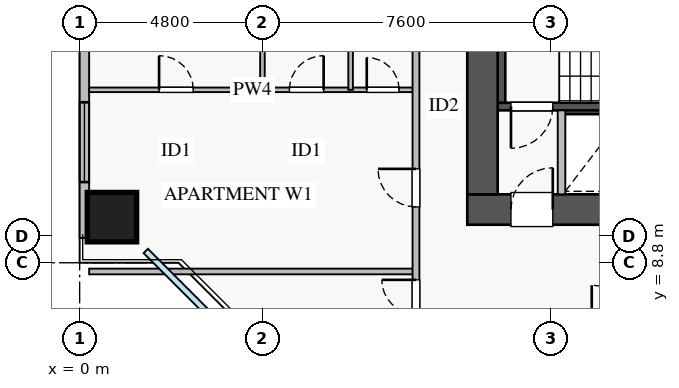
"""IFC4 building model, lengths in metres.
Left out: names, types, materials, properties, quantities, classifications, styles, units other than length and angle.
Written with IfcOpenShell. Run it as: python <this file> out.ifc"""

import sys

from ifc_helpers import new_model, si_unit, direction, frame, frame_2d, origin, origin_2d, place, context, subcontext, project, spatial, rectangle, extrude, source, transform, mapped, element, fill, save


model = new_model("IFC4")
c1 = context("Model", 3, precision=1e-05, world=origin(), true_north=direction((0.0, 1.0)))
c2 = subcontext(c1, "Body", "Model", "MODEL_VIEW")
j1 = project(units=[si_unit("LENGTHUNIT", "METRE"), si_unit("PLANEANGLEUNIT", "RADIAN")], contexts=[c1])
p1 = place(None, origin())
s1 = spatial("IfcSite", under=j1, at=p1, CompositionType="ELEMENT")
p2 = place(p1, origin())
s2 = spatial("IfcBuilding", under=s1, at=p2, CompositionType="ELEMENT")
p3 = place(p2, frame((0.0, 0.0, 32.75)))
s3 = spatial("IfcBuildingStorey", under=s2, at=p3, CompositionType="ELEMENT", Elevation=32.75)
p4 = place(p3, frame((12.68, 12.8, 0.0), z_axis=(0.0, 0.0, 1.0), x_axis=(1.0, 0.0, 0.0)))
e1 = element("IfcWall", 1, at=p4, inside=s3, PredefinedType="SHEAR", context=c2, shape_type="SweptSolid", body=[
    extrude(rectangle(XDim=1.94, YDim=0.18, at=frame_2d((0.97, 0.0))), origin(), (0.0, 0.0, 1.0), 3.07),
])
p5 = place(p3, frame((11.0, 12.91, 0.0), z_axis=(0.0, 0.0, 1.0), x_axis=(1.0, 0.0, 0.0)))
e2 = element("IfcWall", 2, at=p5, inside=s3, PredefinedType="SHEAR", context=c2, shape_type="SweptSolid", body=[
    extrude(rectangle(XDim=7.15, YDim=0.2, at=frame_2d((3.575, 0.0))), origin(), (0.0, 0.0, 1.0), 3.25),
])
p6 = place(p5, frame((0.35, 0.0, 0.0)))
e3 = element("IfcOpeningElement", 3, at=p6, cuts=e2, PredefinedType="OPENING", context=c2, shape_type="SweptSolid", body=[
    extrude(rectangle(XDim=1.1, YDim=2.05, at=frame_2d((0.55, 1.025))), frame((0.0, 0.11, 0.0), z_axis=(0.0, -1.0, 0.0), x_axis=(1.0, 0.0, 0.0)), (0.0, 0.0, 1.0), 0.22),
])
p7 = place(p3, frame((11.1, 13.01, 0.0), z_axis=(0.0, 0.0, 1.0), x_axis=(0.0, 1.0, 0.0)))
e4 = element("IfcWall", 4, at=p7, inside=s3, PredefinedType="SHEAR", context=c2, shape_type="SweptSolid", body=[
    extrude(rectangle(XDim=2.94, YDim=0.2, at=frame_2d((1.47, 0.0))), origin(), (0.0, 0.0, 1.0), 3.25),
])
p8 = place(p3, frame((10.2, 10.2, 0.0), z_axis=(0.0, 0.0, 1.0), x_axis=(1.0, 0.0, 0.0)))
e5 = element("IfcWall", 5, at=p8, inside=s3, PredefinedType="SHEAR", context=c2, shape_type="SweptSolid", body=[
    extrude(rectangle(XDim=17.6, YDim=0.8, at=frame_2d((8.8, 0.0))), origin(), (0.0, 0.0, 1.0), 3.25),
])
p9 = place(p8, frame((1.15, 0.0, 0.0)))
e6 = element("IfcOpeningElement", 6, at=p9, cuts=e5, PredefinedType="OPENING", context=c2, shape_type="SweptSolid", body=[
    extrude(rectangle(XDim=1.1, YDim=2.05, at=frame_2d((0.55, 1.025))), frame((0.0, 0.41, 0.0), z_axis=(0.0, -1.0, 0.0), x_axis=(1.0, 0.0, 0.0)), (0.0, 0.0, 1.0), 0.82),
])
p10 = place(p8, frame((8.3, 0.0, 0.0)))
e7 = element("IfcOpeningElement", 7, at=p10, cuts=e5, PredefinedType="OPENING", context=c2, shape_type="SweptSolid", body=[
    extrude(rectangle(XDim=1.1, YDim=2.05, at=frame_2d((0.55, 1.025))), frame((0.0, 0.41, 0.0), z_axis=(0.0, -1.0, 0.0), x_axis=(1.0, 0.0, 0.0)), (0.0, 0.0, 1.0), 0.82),
])
p11 = place(p8, frame((10.05, 0.0, 0.0)))
e8 = element("IfcOpeningElement", 8, at=p11, cuts=e5, PredefinedType="OPENING", context=c2, shape_type="SweptSolid", body=[
    extrude(rectangle(XDim=1.1, YDim=2.05, at=frame_2d((0.55, 1.025))), frame((0.0, 0.41, 0.0), z_axis=(0.0, -1.0, 0.0), x_axis=(1.0, 0.0, 0.0)), (0.0, 0.0, 1.0), 0.82),
])
p12 = place(p8, frame((14.74, 0.0, 0.0)))
e9 = element("IfcOpeningElement", 9, at=p12, cuts=e5, PredefinedType="OPENING", context=c2, shape_type="SweptSolid", body=[
    extrude(rectangle(XDim=1.0, YDim=2.05, at=frame_2d((0.5, 1.025))), frame((0.0, 0.41, 0.0), z_axis=(0.0, -1.0, 0.0), x_axis=(1.0, 0.0, 0.0)), (0.0, 0.0, 1.0), 0.82),
])
p13 = place(p8, frame((11.835, 0.0, 0.0)))
e10 = element("IfcOpeningElement", 10, at=p13, cuts=e5, PredefinedType="OPENING", context=c2, shape_type="SweptSolid", body=[
    extrude(rectangle(XDim=1.0, YDim=2.05, at=frame_2d((0.5, 1.025))), frame((0.0, 0.41, 0.0), z_axis=(0.0, -1.0, 0.0), x_axis=(1.0, 0.0, 0.0)), (0.0, 0.0, 1.0), 0.82),
])
p14 = place(p8, frame((13.37, 0.0, 0.0)))
e11 = element("IfcOpeningElement", 11, at=p14, cuts=e5, PredefinedType="OPENING", context=c2, shape_type="SweptSolid", body=[
    extrude(rectangle(XDim=1.0, YDim=2.05, at=frame_2d((0.5, 1.025))), frame((0.0, 0.41, 0.0), z_axis=(0.0, -1.0, 0.0), x_axis=(1.0, 0.0, 0.0)), (0.0, 0.0, 1.0), 0.82),
])
p15 = place(p3, frame((10.6, 10.6, 0.0), z_axis=(0.0, 0.0, 1.0), x_axis=(0.0, 1.0, 0.0)))
e12 = element("IfcWall", 12, at=p15, inside=s3, PredefinedType="SHEAR", context=c2, shape_type="SweptSolid", body=[
    extrude(rectangle(XDim=5.6, YDim=0.8, at=frame_2d((2.8, 0.0))), origin(), (0.0, 0.0, 1.0), 3.25),
])
m1 = source(origin(), c2, "Body", "SweptSolid", [
    extrude(rectangle(XDim=1.3, YDim=1.3, at=origin_2d()), origin(), (0.0, 0.0, 1.0), 3.25),
])
p16 = place(p3, frame((0.85, 10.0, 0.0), z_axis=(0.0, 0.0, 1.0), x_axis=(1.0, 0.0, 0.0)))
e13 = element("IfcColumn", 13, at=p16, inside=s3, PredefinedType="COLUMN", context=c2, shape_type="MappedRepresentation", body=[
    mapped(m1, transform((0.0, 0.0, 0.0), x_axis=(1.0, 0.0, 0.0), y_axis=(0.0, 1.0, 0.0), z_axis=(0.0, 0.0, 1.0), scale=1.0)),
])
p17 = place(p3, frame((0.125, 9.45, 0.0), z_axis=(0.0, 0.0, 1.0), x_axis=(0.0, 1.0, 0.0)))
e14 = element("IfcWall", 14, at=p17, inside=s3, PredefinedType="STANDARD", context=c2, shape_type="SweptSolid", body=[
    extrude(rectangle(XDim=27.1, YDim=0.25, at=frame_2d((13.55, 0.0))), origin(), (0.0, 0.0, 1.0), 2.61),
])
p18 = place(p17, frame((14.4, 0.0, 0.0)))
e15 = element("IfcOpeningElement", 15, at=p18, cuts=e14, PredefinedType="OPENING", context=c2, shape_type="SweptSolid", body=[
    extrude(rectangle(XDim=1.2, YDim=2.1, at=frame_2d((0.6, 1.05))), frame((0.0, 0.135, 0.0), z_axis=(0.0, -1.0, 0.0), x_axis=(1.0, 0.0, 0.0)), (0.0, 0.0, 1.0), 0.27),
])
p19 = place(p17, frame((1.472, 0.0, 0.9)))
e16 = element("IfcOpeningElement", 16, at=p19, cuts=e14, PredefinedType="OPENING", context=c2, shape_type="SweptSolid", body=[
    extrude(rectangle(XDim=2.1, YDim=1.5, at=frame_2d((1.05, 0.75))), frame((0.0, 0.135, 0.0), z_axis=(0.0, -1.0, 0.0), x_axis=(1.0, 0.0, 0.0)), (0.0, 0.0, 1.0), 0.27),
])
p20 = place(p17, frame((22.663, 0.0, 0.9)))
e17 = element("IfcOpeningElement", 17, at=p20, cuts=e14, PredefinedType="OPENING", context=c2, shape_type="SweptSolid", body=[
    extrude(rectangle(XDim=2.1, YDim=1.48, at=frame_2d((1.05, 0.74))), frame((0.0, 0.135, 0.0), z_axis=(0.0, -1.0, 0.0), x_axis=(1.0, 0.0, 0.0)), (0.0, 0.0, 1.0), 0.27),
])
p21 = place(p17, frame((5.278, 0.0, 0.9)))
e18 = element("IfcOpeningElement", 18, at=p21, cuts=e14, PredefinedType="OPENING", context=c2, shape_type="SweptSolid", body=[
    extrude(rectangle(XDim=2.4, YDim=1.5, at=frame_2d((1.2, 0.75))), frame((0.0, 0.135, 0.0), z_axis=(0.0, -1.0, 0.0), x_axis=(1.0, 0.0, 0.0)), (0.0, 0.0, 1.0), 0.27),
])
p22 = place(p17, frame((11.365, 0.0, 0.9)))
e19 = element("IfcOpeningElement", 19, at=p22, cuts=e14, PredefinedType="OPENING", context=c2, shape_type="SweptSolid", body=[
    extrude(rectangle(XDim=0.9, YDim=1.2, at=frame_2d((0.45, 0.6))), frame((0.0, 0.135, 0.0), z_axis=(0.0, -1.0, 0.0), x_axis=(1.0, 0.0, 0.0)), (0.0, 0.0, 1.0), 0.27),
])
p23 = place(p3, frame((12.68, 10.6, 0.0), z_axis=(0.0, 0.0, 1.0), x_axis=(0.0, 1.0, 0.0)))
e20 = element("IfcWall", 20, at=p23, inside=s3, PredefinedType="PARTITIONING", context=c2, shape_type="SweptSolid", body=[
    extrude(rectangle(XDim=2.21, YDim=0.2, at=frame_2d((1.105, 0.0))), origin(), (0.0, 0.0, 1.0), 3.07),
])
p24 = place(p3, frame((0.25, 8.57, 0.0), z_axis=(0.0, 0.0, 1.0), x_axis=(1.0, 0.0, 0.0)))
e21 = element("IfcWall", 21, at=p24, inside=s3, PredefinedType="PARTITIONING", context=c2, shape_type="SweptSolid", body=[
    extrude(rectangle(XDim=8.6, YDim=0.15, at=frame_2d((4.3, 0.0))), origin(), (0.0, 0.0, 1.0), 3.07),
])
p25 = place(p3, frame((0.25, 13.35, 0.0), z_axis=(0.0, 0.0, 1.0), x_axis=(1.0, 0.0, 0.0)))
e22 = element("IfcWall", 22, at=p25, inside=s3, PredefinedType="PLUMBINGWALL", context=c2, shape_type="SweptSolid", body=[
    extrude(rectangle(XDim=8.6, YDim=0.12, at=frame_2d((4.3, 0.0))), origin(), (0.0, 0.0, 1.0), 3.07),
])
p26 = place(p25, frame((1.84, 0.0, 0.0)))
e23 = element("IfcOpeningElement", 23, at=p26, cuts=e22, PredefinedType="OPENING", context=c2, shape_type="SweptSolid", body=[
    extrude(rectangle(XDim=0.9, YDim=2.05, at=frame_2d((0.45, 1.025))), frame((0.0, 0.07, 0.0), z_axis=(0.0, -1.0, 0.0), x_axis=(1.0, 0.0, 0.0)), (0.0, 0.0, 1.0), 0.14),
])
p27 = place(p25, frame((5.27, 0.0, 0.0)))
e24 = element("IfcOpeningElement", 24, at=p27, cuts=e22, PredefinedType="OPENING", context=c2, shape_type="SweptSolid", body=[
    extrude(rectangle(XDim=0.9, YDim=2.05, at=frame_2d((0.45, 1.025))), frame((0.0, 0.07, 0.0), z_axis=(0.0, -1.0, 0.0), x_axis=(1.0, 0.0, 0.0)), (0.0, 0.0, 1.0), 0.14),
])
p28 = place(p25, frame((7.305, 0.0, 0.0)))
e25 = element("IfcOpeningElement", 25, at=p28, cuts=e22, PredefinedType="OPENING", context=c2, shape_type="SweptSolid", body=[
    extrude(rectangle(XDim=0.85, YDim=2.05, at=frame_2d((0.425, 1.025))), frame((0.0, 0.07, 0.0), z_axis=(0.0, -1.0, 0.0), x_axis=(1.0, 0.0, 0.0)), (0.0, 0.0, 1.0), 0.14),
])
for number, where, z_axis, x_axis in (
    (26, (4.81, 13.35, 0.0), (0.0, 0.0, 1.0), (0.0, 1.0, 0.0)),
    (27, (7.13, 13.35, 0.0), (0.0, 0.0, 1.0), (0.0, 1.0, 0.0)),
):
    element("IfcWall", number, at=place(p3, frame(where, z_axis=z_axis, x_axis=x_axis)), inside=s3, PredefinedType="PLUMBINGWALL", context=c2, shape_type="SweptSolid", body=[
        extrude(rectangle(XDim=5.17, YDim=0.12, at=frame_2d((2.585, 0.0))), origin(), (0.0, 0.0, 1.0), 3.07),
    ])
p29 = place(p3, frame((8.85, 7.21, 0.0), z_axis=(0.0, 0.0, 1.0), x_axis=(0.0, 1.0, 0.0)))
e28 = element("IfcWall", 28, at=p29, inside=s3, PredefinedType="PARTITIONING", context=c2, shape_type="SweptSolid", body=[
    extrude(rectangle(XDim=31.23, YDim=0.18, at=frame_2d((15.615, 0.0))), origin(), (0.0, 0.0, 1.0), 3.07),
])
p30 = place(p29, frame((30.09, 0.0, 0.0)))
e29 = element("IfcOpeningElement", 29, at=p30, cuts=e28, PredefinedType="OPENING", context=c2, shape_type="SweptSolid", body=[
    extrude(rectangle(XDim=0.9, YDim=2.05, at=frame_2d((0.45, 1.025))), frame((0.0, 0.1, 0.0), z_axis=(0.0, -1.0, 0.0), x_axis=(1.0, 0.0, 0.0)), (0.0, 0.0, 1.0), 0.2),
])
p31 = place(p29, frame((0.24, 0.0, 0.0)))
e30 = element("IfcOpeningElement", 30, at=p31, cuts=e28, PredefinedType="OPENING", context=c2, shape_type="SweptSolid", body=[
    extrude(rectangle(XDim=0.9, YDim=2.05, at=frame_2d((0.45, 1.025))), frame((0.0, 0.1, 0.0), z_axis=(0.0, -1.0, 0.0), x_axis=(1.0, 0.0, 0.0)), (0.0, 0.0, 1.0), 0.2),
])
p32 = place(p29, frame((3.06, 0.0, 0.0)))
e31 = element("IfcOpeningElement", 31, at=p32, cuts=e28, PredefinedType="OPENING", context=c2, shape_type="SweptSolid", body=[
    extrude(rectangle(XDim=1.0, YDim=2.05, at=frame_2d((0.5, 1.025))), frame((0.0, 0.1, 0.0), z_axis=(0.0, -1.0, 0.0), x_axis=(1.0, 0.0, 0.0)), (0.0, 0.0, 1.0), 0.2),
])
p33 = place(p29, frame((12.795, 0.0, 0.0)))
e32 = element("IfcOpeningElement", 32, at=p33, cuts=e28, PredefinedType="OPENING", context=c2, shape_type="SweptSolid", body=[
    extrude(rectangle(XDim=1.0, YDim=2.05, at=frame_2d((0.5, 1.025))), frame((0.0, 0.1, 0.0), z_axis=(0.0, -1.0, 0.0), x_axis=(1.0, 0.0, 0.0)), (0.0, 0.0, 1.0), 0.2),
])
p34 = place(p29, frame((24.62, 0.0, 0.0)))
e33 = element("IfcOpeningElement", 33, at=p34, cuts=e28, PredefinedType="OPENING", context=c2, shape_type="SweptSolid", body=[
    extrude(rectangle(XDim=1.0, YDim=2.05, at=frame_2d((0.5, 1.025))), frame((0.0, 0.1, 0.0), z_axis=(0.0, -1.0, 0.0), x_axis=(1.0, 0.0, 0.0)), (0.0, 0.0, 1.0), 0.2),
])
m2 = source(origin(), c2, "Body", "SweptSolid", [
    extrude(rectangle(XDim=2.1, YDim=1.5, at=frame_2d((1.05, 0.75))), frame((0.0, 0.03, 0.0), z_axis=(0.0, -1.0, 0.0), x_axis=(1.0, 0.0, 0.0)), (0.0, 0.0, 1.0), 0.06),
])
p35 = place(p19, origin())
e34 = element("IfcWindow", 34, at=p35, inside=s3, PartitioningType="TRIPLE_PANEL_VERTICAL", PredefinedType="WINDOW", context=c2, shape_type="MappedRepresentation", body=[
    mapped(m2, transform((0.0, 0.0, 0.0), x_axis=(1.0, 0.0, 0.0), y_axis=(0.0, 1.0, 0.0), z_axis=(0.0, 0.0, 1.0), scale=1.0)),
])
fill(e16, e34)
m3 = source(origin(), c2, "Body", "SweptSolid", [
    extrude(rectangle(XDim=1.1, YDim=2.05, at=frame_2d((0.55, 1.025))), frame((0.0, 0.025, 0.0), z_axis=(0.0, -1.0, 0.0), x_axis=(1.0, 0.0, 0.0)), (0.0, 0.0, 1.0), 0.05),
])
p36 = place(p9, origin())
e35 = element("IfcDoor", 35, at=p36, inside=s3, OperationType="SINGLE_SWING_RIGHT", PredefinedType="DOOR", context=c2, shape_type="MappedRepresentation", body=[
    mapped(m3, transform((0.0, 0.0, 0.0), x_axis=(1.0, 0.0, 0.0), y_axis=(0.0, 1.0, 0.0), z_axis=(0.0, 0.0, 1.0), scale=1.0)),
])
fill(e6, e35)
p37 = place(p6, frame((1.1, 0.0, 0.0), z_axis=(0.0, 0.0, 1.0), x_axis=(-1.0, 0.0, 0.0)))
e36 = element("IfcDoor", 36, at=p37, inside=s3, OperationType="SINGLE_SWING_LEFT", PredefinedType="DOOR", context=c2, shape_type="MappedRepresentation", body=[
    mapped(m3, transform((0.0, 0.0, 0.0), x_axis=(1.0, 0.0, 0.0), y_axis=(0.0, 1.0, 0.0), z_axis=(0.0, 0.0, 1.0), scale=1.0)),
])
fill(e3, e36)
m4 = source(origin(), c2, "Body", "SweptSolid", [
    extrude(rectangle(XDim=0.9, YDim=2.05, at=frame_2d((0.45, 1.025))), frame((0.0, 0.025, 0.0), z_axis=(0.0, -1.0, 0.0), x_axis=(1.0, 0.0, 0.0)), (0.0, 0.0, 1.0), 0.05),
])
p38 = place(p26, origin())
e37 = element("IfcDoor", 37, at=p38, inside=s3, OperationType="SINGLE_SWING_LEFT", PredefinedType="DOOR", context=c2, shape_type="MappedRepresentation", body=[
    mapped(m4, transform((0.0, 0.0, 0.0), x_axis=(1.0, 0.0, 0.0), y_axis=(0.0, 1.0, 0.0), z_axis=(0.0, 0.0, 1.0), scale=1.0)),
])
fill(e23, e37)
p39 = place(p27, origin())
e38 = element("IfcDoor", 38, at=p39, inside=s3, OperationType="SINGLE_SWING_RIGHT", PredefinedType="DOOR", context=c2, shape_type="MappedRepresentation", body=[
    mapped(m4, transform((0.0, 0.0, 0.0), x_axis=(1.0, 0.0, 0.0), y_axis=(0.0, 1.0, 0.0), z_axis=(0.0, 0.0, 1.0), scale=1.0)),
])
fill(e24, e38)
m5 = source(origin(), c2, "Body", "SweptSolid", [
    extrude(rectangle(XDim=0.85, YDim=2.05, at=frame_2d((0.425, 1.025))), frame((0.0, 0.025, 0.0), z_axis=(0.0, -1.0, 0.0), x_axis=(1.0, 0.0, 0.0)), (0.0, 0.0, 1.0), 0.05),
])
p40 = place(p28, origin())
e39 = element("IfcDoor", 39, at=p40, inside=s3, OperationType="SINGLE_SWING_LEFT", PredefinedType="DOOR", context=c2, shape_type="MappedRepresentation", body=[
    mapped(m5, transform((0.0, 0.0, 0.0), x_axis=(1.0, 0.0, 0.0), y_axis=(0.0, 1.0, 0.0), z_axis=(0.0, 0.0, 1.0), scale=1.0)),
])
fill(e25, e39)
p41 = place(p31, origin())
e40 = element("IfcDoor", 40, at=p41, inside=s3, OperationType="SINGLE_SWING_RIGHT", PredefinedType="DOOR", context=c2, shape_type="MappedRepresentation", body=[
    mapped(m4, transform((0.0, 0.0, 0.0), x_axis=(1.0, 0.0, 0.0), y_axis=(0.0, 1.0, 0.0), z_axis=(0.0, 0.0, 1.0), scale=1.0)),
])
fill(e30, e40)
m6 = source(origin(), c2, "Body", "SweptSolid", [
    extrude(rectangle(XDim=1.0, YDim=2.05, at=frame_2d((0.5, 1.025))), frame((0.0, 0.025, 0.0), z_axis=(0.0, -1.0, 0.0), x_axis=(1.0, 0.0, 0.0)), (0.0, 0.0, 1.0), 0.05),
])
p42 = place(p32, origin())
e41 = element("IfcDoor", 41, at=p42, inside=s3, OperationType="SINGLE_SWING_RIGHT", PredefinedType="DOOR", context=c2, shape_type="MappedRepresentation", body=[
    mapped(m6, transform((0.0, 0.0, 0.0), x_axis=(1.0, 0.0, 0.0), y_axis=(0.0, 1.0, 0.0), z_axis=(0.0, 0.0, 1.0), scale=1.0)),
])
fill(e31, e41)
save(model, sys.argv[1])
